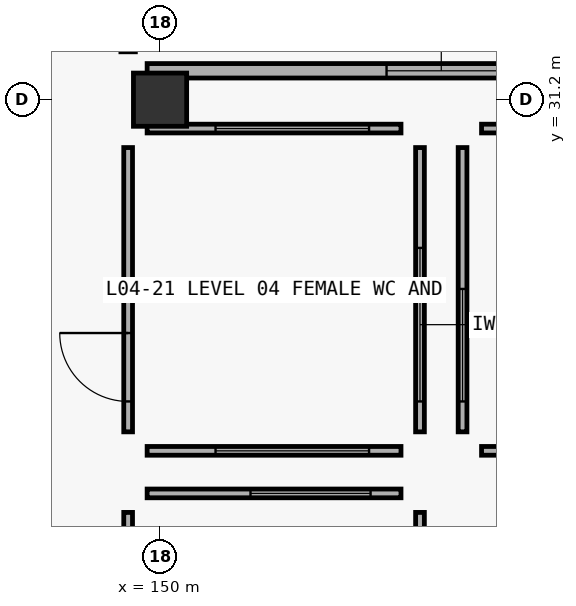
"""IFC4 building model, lengths in metres.
Left out: names, types, materials, properties, quantities, classifications, styles, units other than length and angle.
Written with IfcOpenShell. Run it as: python <this file> out.ifc"""

import sys

from ifc_helpers import new_model, si_unit, direction, frame, frame_2d, origin, origin_2d, place, context, subcontext, project, spatial, rectangle, extrude, element, fill, save


model = new_model("IFC4")
c1 = context("Model", 3, precision=1e-05, world=origin(), true_north=direction((0.0, 1.0)))
c2 = subcontext(c1, "Body", "Model", "MODEL_VIEW")
j1 = project(units=[si_unit("LENGTHUNIT", "METRE"), si_unit("PLANEANGLEUNIT", "RADIAN")], contexts=[c1])
p1 = place(None, origin())
s1 = spatial("IfcSite", under=j1, at=p1, CompositionType="ELEMENT")
p2 = place(p1, origin())
s2 = spatial("IfcBuilding", under=s1, at=p2, CompositionType="ELEMENT")
p3 = place(p2, frame((0.0, 0.0, 20.7)))
s3 = spatial("IfcBuildingStorey", under=s2, at=p3, CompositionType="ELEMENT", Elevation=20.7)
p4 = place(p3, frame((150.0, 31.2, 0.0), z_axis=(0.0, 0.0, 1.0), x_axis=(1.0, 0.0, 0.0)))
e1 = element("IfcColumn", 1, at=p4, inside=s3, PredefinedType="COLUMN", context=c2, shape_type="SweptSolid", body=[
    extrude(rectangle(XDim=0.7, YDim=0.7, at=origin_2d()), origin(), (0.0, 0.0, 1.0), 5.7),
])
p5 = place(p3, frame((149.83, 31.58, 0.0), z_axis=(0.0, 0.0, 1.0), x_axis=(1.0, 0.0, 0.0)))
e2 = element("IfcWall", 2, at=p5, inside=s3, PredefinedType="PARTITIONING", context=c2, shape_type="SweptSolid", body=[
    extrude(rectangle(XDim=7.74, YDim=0.19, at=frame_2d((3.87, 0.0))), origin(), (0.0, 0.0, 1.0), 4.91),
])
p6 = place(p5, frame((3.15, 0.0, 0.9)))
e3 = element("IfcOpeningElement", 3, at=p6, cuts=e2, PredefinedType="OPENING", context=c2, shape_type="SweptSolid", body=[
    extrude(rectangle(XDim=2.68, YDim=1.52, at=frame_2d((1.34, 0.76))), frame((0.0, 0.105, 0.0), z_axis=(0.0, -1.0, 0.0), x_axis=(1.0, 0.0, 0.0)), (0.0, 0.0, 1.0), 0.21),
])
p7 = place(p3, frame((149.58, 22.23, 0.0), z_axis=(0.0, 0.0, 1.0), x_axis=(0.0, 1.0, 0.0)))
e4 = element("IfcWall", 4, at=p7, inside=s3, PredefinedType="PARTITIONING", context=c2, shape_type="SweptSolid", body=[
    extrude(rectangle(XDim=3.54, YDim=0.115, at=frame_2d((1.77, 0.0))), origin(), (0.0, 0.0, 1.0), 4.98),
])
p8 = place(p7, frame((2.15, 0.0, 0.0)))
e5 = element("IfcOpeningElement", 5, at=p8, cuts=e4, PredefinedType="OPENING", context=c2, shape_type="SweptSolid", body=[
    extrude(rectangle(XDim=0.9, YDim=2.1, at=frame_2d((0.45, 1.05))), frame((0.0, 0.067, 0.0), z_axis=(0.0, -1.0, 0.0), x_axis=(1.0, 0.0, 0.0)), (0.0, 0.0, 1.0), 0.135),
])
p9 = place(p3, frame((149.83, 26.02, 0.0), z_axis=(0.0, 0.0, 1.0), x_axis=(1.0, 0.0, 0.0)))
e6 = element("IfcWall", 6, at=p9, inside=s3, PredefinedType="PARTITIONING", context=c2, shape_type="SweptSolid", body=[
    extrude(rectangle(XDim=3.34, YDim=0.115, at=frame_2d((1.67, 0.0))), origin(), (0.0, 0.0, 1.0), 4.66),
])
p10 = place(p9, frame((1.36, 0.0, 0.9)))
e7 = element("IfcOpeningElement", 7, at=p10, cuts=e6, PredefinedType="OPENING", context=c2, shape_type="SweptSolid", body=[
    extrude(rectangle(XDim=1.58, YDim=1.24, at=frame_2d((0.79, 0.62))), frame((0.0, 0.067, 0.0), z_axis=(0.0, -1.0, 0.0), x_axis=(1.0, 0.0, 0.0)), (0.0, 0.0, 1.0), 0.135),
])
p11 = place(p3, frame((153.42, 22.23, 0.0), z_axis=(0.0, 0.0, 1.0), x_axis=(0.0, 1.0, 0.0)))
e8 = element("IfcWall", 8, at=p11, inside=s3, PredefinedType="PARTITIONING", context=c2, shape_type="SweptSolid", body=[
    extrude(rectangle(XDim=3.54, YDim=0.115, at=frame_2d((1.77, 0.0))), origin(), (0.0, 0.0, 1.0), 4.98),
])
p12 = place(p11, frame((1.56, 0.0, 0.9)))
e9 = element("IfcOpeningElement", 9, at=p12, cuts=e8, PredefinedType="OPENING", context=c2, shape_type="SweptSolid", body=[
    extrude(rectangle(XDim=1.58, YDim=1.24, at=frame_2d((0.79, 0.62))), frame((0.0, 0.067, 0.0), z_axis=(0.0, -1.0, 0.0), x_axis=(1.0, 0.0, 0.0)), (0.0, 0.0, 1.0), 0.135),
])
p13 = place(p3, frame((149.58, 26.83, 0.0), z_axis=(0.0, 0.0, 1.0), x_axis=(0.0, 1.0, 0.0)))
e10 = element("IfcWall", 10, at=p13, inside=s3, PredefinedType="PARTITIONING", context=c2, shape_type="SweptSolid", body=[
    extrude(rectangle(XDim=3.74, YDim=0.115, at=frame_2d((1.87, 0.0))), origin(), (0.0, 0.0, 1.0), 4.98),
])
p14 = place(p13, frame((0.4, 0.0, 0.0)))
e11 = element("IfcOpeningElement", 11, at=p14, cuts=e10, PredefinedType="OPENING", context=c2, shape_type="SweptSolid", body=[
    extrude(rectangle(XDim=0.9, YDim=2.1, at=frame_2d((0.45, 1.05))), frame((0.0, 0.067, 0.0), z_axis=(0.0, -1.0, 0.0), x_axis=(1.0, 0.0, 0.0)), (0.0, 0.0, 1.0), 0.135),
])
p15 = place(p3, frame((149.83, 26.58, 0.0), z_axis=(0.0, 0.0, 1.0), x_axis=(1.0, 0.0, 0.0)))
e12 = element("IfcWall", 12, at=p15, inside=s3, PredefinedType="PARTITIONING", context=c2, shape_type="SweptSolid", body=[
    extrude(rectangle(XDim=3.34, YDim=0.115, at=frame_2d((1.67, 0.0))), origin(), (0.0, 0.0, 1.0), 4.66),
])
p16 = place(p15, frame((0.9, 0.0, 0.9)))
e13 = element("IfcOpeningElement", 13, at=p16, cuts=e12, PredefinedType="OPENING", context=c2, shape_type="SweptSolid", body=[
    extrude(rectangle(XDim=2.02, YDim=1.32, at=frame_2d((1.01, 0.66))), frame((0.0, 0.067, 0.0), z_axis=(0.0, -1.0, 0.0), x_axis=(1.0, 0.0, 0.0)), (0.0, 0.0, 1.0), 0.135),
])
p17 = place(p3, frame((149.83, 30.82, 0.0), z_axis=(0.0, 0.0, 1.0), x_axis=(1.0, 0.0, 0.0)))
e14 = element("IfcWall", 14, at=p17, inside=s3, PredefinedType="PARTITIONING", context=c2, shape_type="SweptSolid", body=[
    extrude(rectangle(XDim=3.34, YDim=0.115, at=frame_2d((1.67, 0.0))), origin(), (0.0, 0.0, 1.0), 4.66),
])
p18 = place(p17, frame((0.9, 0.0, 0.9)))
e15 = element("IfcOpeningElement", 15, at=p18, cuts=e14, PredefinedType="OPENING", context=c2, shape_type="SweptSolid", body=[
    extrude(rectangle(XDim=2.02, YDim=1.32, at=frame_2d((1.01, 0.66))), frame((0.0, 0.067, 0.0), z_axis=(0.0, -1.0, 0.0), x_axis=(1.0, 0.0, 0.0)), (0.0, 0.0, 1.0), 0.135),
])
p19 = place(p3, frame((153.42, 26.83, 0.0), z_axis=(0.0, 0.0, 1.0), x_axis=(0.0, 1.0, 0.0)))
e16 = element("IfcWall", 16, at=p19, inside=s3, PredefinedType="PARTITIONING", context=c2, shape_type="SweptSolid", body=[
    extrude(rectangle(XDim=3.74, YDim=0.115, at=frame_2d((1.87, 0.0))), origin(), (0.0, 0.0, 1.0), 4.98),
])
p20 = place(p19, frame((0.4, 0.0, 0.9)))
e17 = element("IfcOpeningElement", 17, at=p20, cuts=e16, PredefinedType="OPENING", context=c2, shape_type="SweptSolid", body=[
    extrude(rectangle(XDim=2.02, YDim=1.32, at=frame_2d((1.01, 0.66))), frame((0.0, 0.067, 0.0), z_axis=(0.0, -1.0, 0.0), x_axis=(1.0, 0.0, 0.0)), (0.0, 0.0, 1.0), 0.135),
])
p21 = place(p3, frame((154.23, 30.82, 0.0), z_axis=(0.0, 0.0, 1.0), x_axis=(1.0, 0.0, 0.0)))
e18 = element("IfcWall", 18, at=p21, inside=s3, PredefinedType="PARTITIONING", context=c2, shape_type="SweptSolid", body=[
    extrude(rectangle(XDim=3.34, YDim=0.115, at=frame_2d((1.67, 0.0))), origin(), (0.0, 0.0, 1.0), 4.98),
])
p22 = place(p21, frame((0.4, 0.0, 0.0)))
e19 = element("IfcOpeningElement", 19, at=p22, cuts=e18, PredefinedType="OPENING", context=c2, shape_type="SweptSolid", body=[
    extrude(rectangle(XDim=0.96, YDim=2.14, at=frame_2d((0.48, 1.07))), frame((0.0, 0.067, 0.0), z_axis=(0.0, -1.0, 0.0), x_axis=(1.0, 0.0, 0.0)), (0.0, 0.0, 1.0), 0.135),
])
p23 = place(p3, frame((154.23, 26.58, 0.0), z_axis=(0.0, 0.0, 1.0), x_axis=(1.0, 0.0, 0.0)))
e20 = element("IfcWall", 20, at=p23, inside=s3, PredefinedType="PARTITIONING", context=c2, shape_type="SweptSolid", body=[
    extrude(rectangle(XDim=3.34, YDim=0.115, at=frame_2d((1.67, 0.0))), origin(), (0.0, 0.0, 1.0), 4.98),
])
p24 = place(p23, frame((0.4, 0.0, 0.9)))
e21 = element("IfcOpeningElement", 21, at=p24, cuts=e20, PredefinedType="OPENING", context=c2, shape_type="SweptSolid", body=[
    extrude(rectangle(XDim=1.48, YDim=1.35, at=frame_2d((0.74, 0.675))), frame((0.0, 0.067, 0.0), z_axis=(0.0, -1.0, 0.0), x_axis=(1.0, 0.0, 0.0)), (0.0, 0.0, 1.0), 0.135),
])
p25 = place(p3, frame((153.98, 26.83, 0.0), z_axis=(0.0, 0.0, 1.0), x_axis=(0.0, 1.0, 0.0)))
e22 = element("IfcWall", 22, at=p25, inside=s3, PredefinedType="PARTITIONING", context=c2, shape_type="SweptSolid", body=[
    extrude(rectangle(XDim=3.74, YDim=0.115, at=frame_2d((1.87, 0.0))), origin(), (0.0, 0.0, 1.0), 4.98),
])
p26 = place(p25, frame((0.4, 0.0, 0.9)))
e23 = element("IfcOpeningElement", 23, at=p26, cuts=e22, PredefinedType="OPENING", context=c2, shape_type="SweptSolid", body=[
    extrude(rectangle(XDim=1.48, YDim=1.35, at=frame_2d((0.74, 0.675))), frame((0.0, 0.067, 0.0), z_axis=(0.0, -1.0, 0.0), x_axis=(1.0, 0.0, 0.0)), (0.0, 0.0, 1.0), 0.135),
])
p27 = place(p6, origin())
e24 = element("IfcWindow", 24, at=p27, inside=s3, PartitioningType="SINGLE_PANEL", PredefinedType="WINDOW", context=c2, shape_type="SweptSolid", body=[
    extrude(rectangle(XDim=2.68, YDim=1.52, at=frame_2d((1.34, 0.76))), frame((0.0, 0.03, 0.0), z_axis=(0.0, -1.0, 0.0), x_axis=(1.0, 0.0, 0.0)), (0.0, 0.0, 1.0), 0.06),
])
fill(e3, e24)
p28 = place(p10, origin())
e25 = element("IfcWindow", 25, at=p28, inside=s3, PartitioningType="SINGLE_PANEL", PredefinedType="WINDOW", context=c2, shape_type="SweptSolid", body=[
    extrude(rectangle(XDim=1.58, YDim=1.24, at=frame_2d((0.79, 0.62))), frame((0.0, 0.03, 0.0), z_axis=(0.0, -1.0, 0.0), x_axis=(1.0, 0.0, 0.0)), (0.0, 0.0, 1.0), 0.06),
])
fill(e7, e25)
p29 = place(p14, origin())
e26 = element("IfcDoor", 26, at=p29, inside=s3, OperationType="SINGLE_SWING_RIGHT", PredefinedType="DOOR", context=c2, shape_type="SweptSolid", body=[
    extrude(rectangle(XDim=0.9, YDim=2.1, at=frame_2d((0.45, 1.05))), frame((0.0, 0.025, 0.0), z_axis=(0.0, -1.0, 0.0), x_axis=(1.0, 0.0, 0.0)), (0.0, 0.0, 1.0), 0.05),
])
fill(e11, e26)
p30 = place(p16, origin())
e27 = element("IfcWindow", 27, at=p30, inside=s3, PartitioningType="SINGLE_PANEL", PredefinedType="WINDOW", context=c2, shape_type="SweptSolid", body=[
    extrude(rectangle(XDim=2.02, YDim=1.32, at=frame_2d((1.01, 0.66))), frame((0.0, 0.03, 0.0), z_axis=(0.0, -1.0, 0.0), x_axis=(1.0, 0.0, 0.0)), (0.0, 0.0, 1.0), 0.06),
])
fill(e13, e27)
p31 = place(p18, origin())
e28 = element("IfcWindow", 28, at=p31, inside=s3, PartitioningType="SINGLE_PANEL", PredefinedType="WINDOW", context=c2, shape_type="SweptSolid", body=[
    extrude(rectangle(XDim=2.02, YDim=1.32, at=frame_2d((1.01, 0.66))), frame((0.0, 0.03, 0.0), z_axis=(0.0, -1.0, 0.0), x_axis=(1.0, 0.0, 0.0)), (0.0, 0.0, 1.0), 0.06),
])
fill(e15, e28)
p32 = place(p20, origin())
e29 = element("IfcWindow", 29, at=p32, inside=s3, PartitioningType="SINGLE_PANEL", PredefinedType="WINDOW", context=c2, shape_type="SweptSolid", body=[
    extrude(rectangle(XDim=2.02, YDim=1.32, at=frame_2d((1.01, 0.66))), frame((0.0, 0.03, 0.0), z_axis=(0.0, -1.0, 0.0), x_axis=(1.0, 0.0, 0.0)), (0.0, 0.0, 1.0), 0.06),
])
fill(e17, e29)
p33 = place(p26, origin())
e30 = element("IfcWindow", 30, at=p33, inside=s3, PartitioningType="SINGLE_PANEL", PredefinedType="WINDOW", context=c2, shape_type="SweptSolid", body=[
    extrude(rectangle(XDim=1.48, YDim=1.35, at=frame_2d((0.74, 0.675))), frame((0.0, 0.03, 0.0), z_axis=(0.0, -1.0, 0.0), x_axis=(1.0, 0.0, 0.0)), (0.0, 0.0, 1.0), 0.06),
])
fill(e23, e30)
save(model, sys.argv[1])
